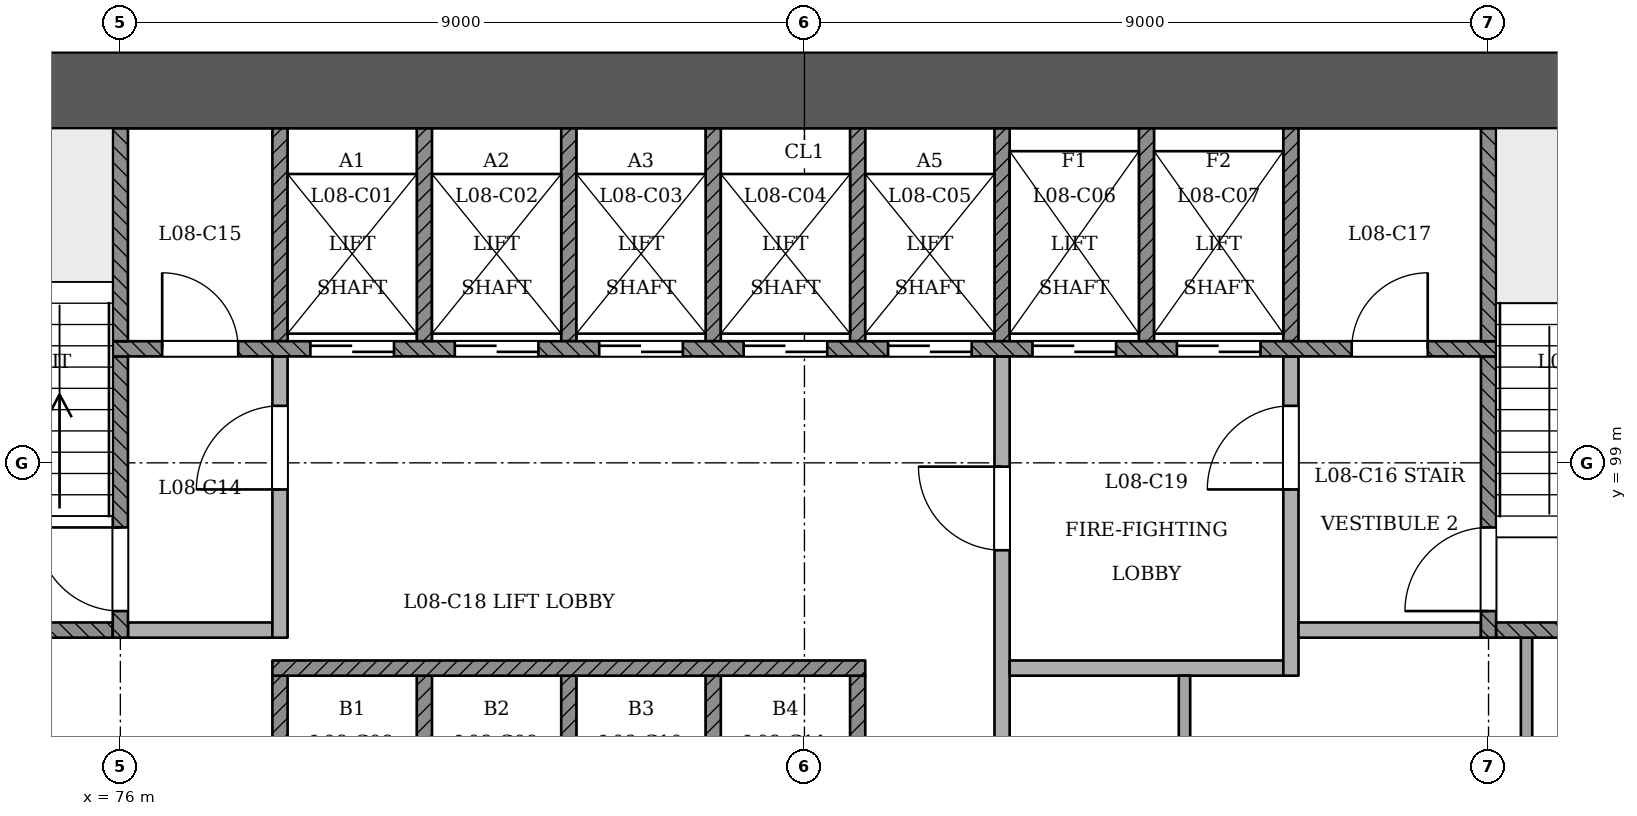
"""IFC4 building model, lengths in metres.
Left out: names, types, materials, properties, quantities, classifications, styles, units other than length and angle.
Written with IfcOpenShell. Run it as: python <this file> out.ifc"""

import sys

from ifc_helpers import new_model, si_unit, direction, frame, frame_2d, origin, place, context, subcontext, project, spatial, rectangle, extrude, element, fill, save


model = new_model("IFC4")
c1 = context("Model", 3, precision=1e-05, world=origin(), true_north=direction((0.0, 1.0)))
c2 = subcontext(c1, "Body", "Model", "MODEL_VIEW")
j1 = project(units=[si_unit("LENGTHUNIT", "METRE"), si_unit("PLANEANGLEUNIT", "RADIAN")], contexts=[c1])
p1 = place(None, origin())
s1 = spatial("IfcSite", under=j1, at=p1, CompositionType="ELEMENT")
p2 = place(p1, origin())
s2 = spatial("IfcBuilding", under=s1, at=p2, CompositionType="ELEMENT")
p3 = place(p2, frame((0.0, 0.0, 37.8)))
s3 = spatial("IfcBuildingStorey", under=s2, at=p3, CompositionType="ELEMENT", Elevation=37.8)
p4 = place(p3, frame((97.5, 103.9, 0.0), z_axis=(0.0, 0.0, 1.0), x_axis=(-1.0, 0.0, 0.0)))
e1 = element("IfcWall", 1, at=p4, inside=s3, PredefinedType="SHEAR", context=c2, shape_type="SweptSolid", body=[
    extrude(rectangle(XDim=25.5, YDim=1.0, at=frame_2d((12.75, 0.0))), origin(), (0.0, 0.0, 1.0), 3.6),
])
p5 = place(p3, frame((61.497, 96.54, 0.0), z_axis=(0.0, 0.0, 1.0), x_axis=(0.499995935097, -0.866027750645, 0.0)))
e2 = element("IfcWall", 2, at=p5, inside=s3, PredefinedType="PARTITIONING", context=c2, shape_type="SweptSolid", body=[
    extrude(rectangle(XDim=44.742, YDim=0.15, at=frame_2d((22.371, 0.0))), origin(), (0.0, 0.0, 1.0), 2.7),
])
p6 = place(p5, frame((1.84, 0.0, 0.0)))
e3 = element("IfcOpeningElement", 3, at=p6, cuts=e2, PredefinedType="OPENING", context=c2, shape_type="SweptSolid", body=[
    extrude(rectangle(XDim=1.0, YDim=2.1, at=frame_2d((0.5, 1.05))), frame((0.0, 0.085, 0.0), z_axis=(0.0, -1.0, 0.0), x_axis=(1.0, 0.0, 0.0)), (0.0, 0.0, 1.0), 0.171),
])
p7 = place(p5, frame((4.942, 0.0, 0.0)))
e4 = element("IfcOpeningElement", 4, at=p7, cuts=e2, PredefinedType="OPENING", context=c2, shape_type="SweptSolid", body=[
    extrude(rectangle(XDim=1.1, YDim=2.1, at=frame_2d((0.55, 1.05))), frame((0.0, 0.085, 0.0), z_axis=(0.0, -1.0, 0.0), x_axis=(1.0, 0.0, 0.0)), (0.0, 0.0, 1.0), 0.171),
])
p8 = place(p5, frame((11.651, 0.0, 0.0)))
e5 = element("IfcOpeningElement", 5, at=p8, cuts=e2, PredefinedType="OPENING", context=c2, shape_type="SweptSolid", body=[
    extrude(rectangle(XDim=1.0, YDim=2.1, at=frame_2d((0.5, 1.05))), frame((0.0, 0.085, 0.0), z_axis=(0.0, -1.0, 0.0), x_axis=(1.0, 0.0, 0.0)), (0.0, 0.0, 1.0), 0.171),
])
p9 = place(p5, frame((18.371, 0.0, 0.0)))
e6 = element("IfcOpeningElement", 6, at=p9, cuts=e2, PredefinedType="OPENING", context=c2, shape_type="SweptSolid", body=[
    extrude(rectangle(XDim=1.2, YDim=2.1, at=frame_2d((0.6, 1.05))), frame((0.0, 0.085, 0.0), z_axis=(0.0, -1.0, 0.0), x_axis=(1.0, 0.0, 0.0)), (0.0, 0.0, 1.0), 0.171),
])
p10 = place(p5, frame((23.092, 0.0, 0.0)))
e7 = element("IfcOpeningElement", 7, at=p10, cuts=e2, PredefinedType="OPENING", context=c2, shape_type="SweptSolid", body=[
    extrude(rectangle(XDim=1.0, YDim=2.1, at=frame_2d((0.5, 1.05))), frame((0.0, 0.085, 0.0), z_axis=(0.0, -1.0, 0.0), x_axis=(1.0, 0.0, 0.0)), (0.0, 0.0, 1.0), 0.171),
])
p11 = place(p5, frame((29.767, 0.0, 0.0)))
e8 = element("IfcOpeningElement", 8, at=p11, cuts=e2, PredefinedType="OPENING", context=c2, shape_type="SweptSolid", body=[
    extrude(rectangle(XDim=1.0, YDim=2.1, at=frame_2d((0.5, 1.05))), frame((0.0, 0.085, 0.0), z_axis=(0.0, -1.0, 0.0), x_axis=(1.0, 0.0, 0.0)), (0.0, 0.0, 1.0), 0.171),
])
p12 = place(p5, frame((31.976, 0.0, 0.0)))
e9 = element("IfcOpeningElement", 9, at=p12, cuts=e2, PredefinedType="OPENING", context=c2, shape_type="SweptSolid", body=[
    extrude(rectangle(XDim=1.0, YDim=2.1, at=frame_2d((0.5, 1.05))), frame((0.0, 0.085, 0.0), z_axis=(0.0, -1.0, 0.0), x_axis=(1.0, 0.0, 0.0)), (0.0, 0.0, 1.0), 0.171),
])
p13 = place(p5, frame((38.767, 0.0, 0.0)))
e10 = element("IfcOpeningElement", 10, at=p13, cuts=e2, PredefinedType="OPENING", context=c2, shape_type="SweptSolid", body=[
    extrude(rectangle(XDim=1.0, YDim=2.1, at=frame_2d((0.5, 1.05))), frame((0.0, 0.085, 0.0), z_axis=(0.0, -1.0, 0.0), x_axis=(1.0, 0.0, 0.0)), (0.0, 0.0, 1.0), 0.171),
])
p14 = place(p5, frame((40.707, 0.0, 0.0)))
e11 = element("IfcOpeningElement", 11, at=p14, cuts=e2, PredefinedType="OPENING", context=c2, shape_type="SweptSolid", body=[
    extrude(rectangle(XDim=1.0, YDim=2.1, at=frame_2d((0.5, 1.05))), frame((0.0, 0.085, 0.0), z_axis=(0.0, -1.0, 0.0), x_axis=(1.0, 0.0, 0.0)), (0.0, 0.0, 1.0), 0.171),
])
for number, where, z_axis, x_axis in (
    (12, (78.1, 93.4, 0.0), (0.0, 0.0, 1.0), (0.0, 1.0, 0.0)),
    (13, (80.0, 93.4, 0.0), (0.0, 0.0, 1.0), (0.0, 1.0, 0.0)),
    (14, (81.9, 93.4, 0.0), (0.0, 0.0, 1.0), (0.0, 1.0, 0.0)),
    (15, (83.8, 93.4, 0.0), (0.0, 0.0, 1.0), (0.0, 1.0, 0.0)),
    (16, (85.7, 93.4, 0.0), (0.0, 0.0, 1.0), (0.0, 1.0, 0.0)),
):
    element("IfcWall", number, at=place(p3, frame(where, z_axis=z_axis, x_axis=x_axis)), inside=s3, PredefinedType="SOLIDWALL", context=c2, shape_type="SweptSolid", body=[
        extrude(rectangle(XDim=2.8, YDim=0.2, at=frame_2d((1.4, 0.0))), origin(), (0.0, 0.0, 1.0), 3.1),
    ])
p15 = place(p3, frame((87.6, 93.4, 0.0), z_axis=(0.0, 0.0, 1.0), x_axis=(0.0, 1.0, 0.0)))
e17 = element("IfcWall", 17, at=p15, inside=s3, PredefinedType="PARTITIONING", context=c2, shape_type="SweptSolid", body=[
    extrude(rectangle(XDim=7.0, YDim=0.2, at=frame_2d((3.5, 0.0))), origin(), (0.0, 0.0, 1.0), 3.1),
])
p16 = place(p15, frame((4.45, 0.0, 0.0)))
e18 = element("IfcOpeningElement", 18, at=p16, cuts=e17, PredefinedType="OPENING", context=c2, shape_type="SweptSolid", body=[
    extrude(rectangle(XDim=1.1, YDim=2.1, at=frame_2d((0.55, 1.05))), frame((0.0, 0.11, 0.0), z_axis=(0.0, -1.0, 0.0), x_axis=(1.0, 0.0, 0.0)), (0.0, 0.0, 1.0), 0.221),
])
p17 = place(p3, frame((90.0, 93.4, 0.0), z_axis=(0.0, 0.0, 1.0), x_axis=(0.0, 1.0, 0.0)))
e19 = element("IfcWall", 19, at=p17, inside=s3, PredefinedType="PARTITIONING", context=c2, shape_type="SweptSolid", body=[
    extrude(rectangle(XDim=2.8, YDim=0.15, at=frame_2d((1.4, 0.0))), origin(), (0.0, 0.0, 1.0), 3.1),
])
p18 = place(p3, frame((94.5, 93.4, 0.0), z_axis=(0.0, 0.0, 1.0), x_axis=(0.0, 1.0, 0.0)))
e20 = element("IfcWall", 20, at=p18, inside=s3, PredefinedType="PARTITIONING", context=c2, shape_type="SweptSolid", body=[
    extrude(rectangle(XDim=3.3, YDim=0.15, at=frame_2d((1.65, 0.0))), origin(), (0.0, 0.0, 1.0), 3.1),
])
p19 = place(p3, frame((78.0, 96.3, 0.0), z_axis=(0.0, 0.0, 1.0), x_axis=(1.0, 0.0, 0.0)))
e21 = element("IfcWall", 21, at=p19, inside=s3, PredefinedType="SOLIDWALL", context=c2, shape_type="SweptSolid", body=[
    extrude(rectangle(XDim=7.8, YDim=0.2, at=frame_2d((3.9, 0.0))), origin(), (0.0, 0.0, 1.0), 3.1),
])
p20 = place(p3, frame((87.7, 96.3, 0.0), z_axis=(0.0, 0.0, 1.0), x_axis=(1.0, 0.0, 0.0)))
e22 = element("IfcWall", 22, at=p20, inside=s3, PredefinedType="PARTITIONING", context=c2, shape_type="SweptSolid", body=[
    extrude(rectangle(XDim=3.6, YDim=0.2, at=frame_2d((1.8, 0.0))), origin(), (0.0, 0.0, 1.0), 3.1),
])
p21 = place(p3, frame((91.4, 96.2, 0.0), z_axis=(0.0, 0.0, 1.0), x_axis=(0.0, 1.0, 0.0)))
e23 = element("IfcWall", 23, at=p21, inside=s3, PredefinedType="PARTITIONING", context=c2, shape_type="SweptSolid", body=[
    extrude(rectangle(XDim=4.2, YDim=0.2, at=frame_2d((2.1, 0.0))), origin(), (0.0, 0.0, 1.0), 3.1),
])
p22 = place(p21, frame((2.45, 0.0, 0.0)))
e24 = element("IfcOpeningElement", 24, at=p22, cuts=e23, PredefinedType="OPENING", context=c2, shape_type="SweptSolid", body=[
    extrude(rectangle(XDim=1.1, YDim=2.1, at=frame_2d((0.55, 1.05))), frame((0.0, 0.11, 0.0), z_axis=(0.0, -1.0, 0.0), x_axis=(1.0, 0.0, 0.0)), (0.0, 0.0, 1.0), 0.221),
])
p23 = place(p3, frame((73.0, 96.8, 0.0), z_axis=(0.0, 0.0, 1.0), x_axis=(1.0, 0.0, 0.0)))
e25 = element("IfcWall", 25, at=p23, inside=s3, PredefinedType="SOLIDWALL", context=c2, shape_type="SweptSolid", body=[
    extrude(rectangle(XDim=2.9, YDim=0.2, at=frame_2d((1.45, 0.0))), origin(), (0.0, 0.0, 1.0), 3.1),
])
p24 = place(p3, frame((76.0, 96.7, 0.0), z_axis=(0.0, 0.0, 1.0), x_axis=(0.0, 1.0, 0.0)))
e26 = element("IfcWall", 26, at=p24, inside=s3, PredefinedType="SOLIDWALL", context=c2, shape_type="SweptSolid", body=[
    extrude(rectangle(XDim=3.7, YDim=0.2, at=frame_2d((1.85, 0.0))), origin(), (0.0, 0.0, 1.0), 3.1),
])
p25 = place(p24, frame((0.35, 0.0, 0.0)))
e27 = element("IfcOpeningElement", 27, at=p25, cuts=e26, PredefinedType="OPENING", context=c2, shape_type="SweptSolid", body=[
    extrude(rectangle(XDim=1.1, YDim=2.1, at=frame_2d((0.55, 1.05))), frame((0.0, 0.11, 0.0), z_axis=(0.0, -1.0, 0.0), x_axis=(1.0, 0.0, 0.0)), (0.0, 0.0, 1.0), 0.221),
])
p26 = place(p3, frame((76.1, 96.8, 0.0), z_axis=(0.0, 0.0, 1.0), x_axis=(1.0, 0.0, 0.0)))
e28 = element("IfcWall", 28, at=p26, inside=s3, PredefinedType="PARTITIONING", context=c2, shape_type="SweptSolid", body=[
    extrude(rectangle(XDim=1.9, YDim=0.2, at=frame_2d((0.95, 0.0))), origin(), (0.0, 0.0, 1.0), 3.1),
])
p27 = place(p3, frame((78.1, 96.7, 0.0), z_axis=(0.0, 0.0, 1.0), x_axis=(0.0, 1.0, 0.0)))
e29 = element("IfcWall", 29, at=p27, inside=s3, PredefinedType="PARTITIONING", context=c2, shape_type="SweptSolid", body=[
    extrude(rectangle(XDim=3.7, YDim=0.2, at=frame_2d((1.85, 0.0))), origin(), (0.0, 0.0, 1.0), 3.1),
])
p28 = place(p27, frame((1.95, 0.0, 0.0)))
e30 = element("IfcOpeningElement", 30, at=p28, cuts=e29, PredefinedType="OPENING", context=c2, shape_type="SweptSolid", body=[
    extrude(rectangle(XDim=1.1, YDim=2.1, at=frame_2d((0.55, 1.05))), frame((0.0, 0.11, 0.0), z_axis=(0.0, -1.0, 0.0), x_axis=(1.0, 0.0, 0.0)), (0.0, 0.0, 1.0), 0.221),
])
p29 = place(p3, frame((91.5, 96.8, 0.0), z_axis=(0.0, 0.0, 1.0), x_axis=(1.0, 0.0, 0.0)))
e31 = element("IfcWall", 31, at=p29, inside=s3, PredefinedType="PARTITIONING", context=c2, shape_type="SweptSolid", body=[
    extrude(rectangle(XDim=2.4, YDim=0.2, at=frame_2d((1.2, 0.0))), origin(), (0.0, 0.0, 1.0), 3.1),
])
p30 = place(p3, frame((94.0, 96.7, 0.0), z_axis=(0.0, 0.0, 1.0), x_axis=(0.0, 1.0, 0.0)))
e32 = element("IfcWall", 32, at=p30, inside=s3, PredefinedType="SOLIDWALL", context=c2, shape_type="SweptSolid", body=[
    extrude(rectangle(XDim=3.7, YDim=0.2, at=frame_2d((1.85, 0.0))), origin(), (0.0, 0.0, 1.0), 3.1),
])
p31 = place(p30, frame((0.35, 0.0, 0.0)))
e33 = element("IfcOpeningElement", 33, at=p31, cuts=e32, PredefinedType="OPENING", context=c2, shape_type="SweptSolid", body=[
    extrude(rectangle(XDim=1.1, YDim=2.1, at=frame_2d((0.55, 1.05))), frame((0.0, 0.11, 0.0), z_axis=(0.0, -1.0, 0.0), x_axis=(1.0, 0.0, 0.0)), (0.0, 0.0, 1.0), 0.221),
])
p32 = place(p3, frame((94.1, 96.8, 0.0), z_axis=(0.0, 0.0, 1.0), x_axis=(1.0, 0.0, 0.0)))
e34 = element("IfcWall", 34, at=p32, inside=s3, PredefinedType="SOLIDWALL", context=c2, shape_type="SweptSolid", body=[
    extrude(rectangle(XDim=2.9, YDim=0.2, at=frame_2d((1.45, 0.0))), origin(), (0.0, 0.0, 1.0), 3.1),
])
p33 = place(p3, frame((75.9, 100.5, 0.0), z_axis=(0.0, 0.0, 1.0), x_axis=(1.0, 0.0, 0.0)))
e35 = element("IfcWall", 35, at=p33, inside=s3, PredefinedType="SOLIDWALL", context=c2, shape_type="SweptSolid", body=[
    extrude(rectangle(XDim=18.2, YDim=0.2, at=frame_2d((9.1, 0.0))), origin(), (0.0, 0.0, 1.0), 3.1),
])
p34 = place(p33, frame((2.6, 0.0, 0.0)))
e36 = element("IfcOpeningElement", 36, at=p34, cuts=e35, PredefinedType="OPENING", context=c2, shape_type="SweptSolid", body=[
    extrude(rectangle(XDim=1.1, YDim=2.1, at=frame_2d((0.55, 1.05))), frame((0.0, 0.11, 0.0), z_axis=(0.0, -1.0, 0.0), x_axis=(1.0, 0.0, 0.0)), (0.0, 0.0, 1.0), 0.221),
])
p35 = place(p33, frame((4.5, 0.0, 0.0)))
e37 = element("IfcOpeningElement", 37, at=p35, cuts=e35, PredefinedType="OPENING", context=c2, shape_type="SweptSolid", body=[
    extrude(rectangle(XDim=1.1, YDim=2.1, at=frame_2d((0.55, 1.05))), frame((0.0, 0.11, 0.0), z_axis=(0.0, -1.0, 0.0), x_axis=(1.0, 0.0, 0.0)), (0.0, 0.0, 1.0), 0.221),
])
p36 = place(p33, frame((6.4, 0.0, 0.0)))
e38 = element("IfcOpeningElement", 38, at=p36, cuts=e35, PredefinedType="OPENING", context=c2, shape_type="SweptSolid", body=[
    extrude(rectangle(XDim=1.1, YDim=2.1, at=frame_2d((0.55, 1.05))), frame((0.0, 0.11, 0.0), z_axis=(0.0, -1.0, 0.0), x_axis=(1.0, 0.0, 0.0)), (0.0, 0.0, 1.0), 0.221),
])
p37 = place(p33, frame((8.3, 0.0, 0.0)))
e39 = element("IfcOpeningElement", 39, at=p37, cuts=e35, PredefinedType="OPENING", context=c2, shape_type="SweptSolid", body=[
    extrude(rectangle(XDim=1.1, YDim=2.1, at=frame_2d((0.55, 1.05))), frame((0.0, 0.11, 0.0), z_axis=(0.0, -1.0, 0.0), x_axis=(1.0, 0.0, 0.0)), (0.0, 0.0, 1.0), 0.221),
])
p38 = place(p33, frame((10.2, 0.0, 0.0)))
e40 = element("IfcOpeningElement", 40, at=p38, cuts=e35, PredefinedType="OPENING", context=c2, shape_type="SweptSolid", body=[
    extrude(rectangle(XDim=1.1, YDim=2.1, at=frame_2d((0.55, 1.05))), frame((0.0, 0.11, 0.0), z_axis=(0.0, -1.0, 0.0), x_axis=(1.0, 0.0, 0.0)), (0.0, 0.0, 1.0), 0.221),
])
p39 = place(p33, frame((12.1, 0.0, 0.0)))
e41 = element("IfcOpeningElement", 41, at=p39, cuts=e35, PredefinedType="OPENING", context=c2, shape_type="SweptSolid", body=[
    extrude(rectangle(XDim=1.1, YDim=2.1, at=frame_2d((0.55, 1.05))), frame((0.0, 0.11, 0.0), z_axis=(0.0, -1.0, 0.0), x_axis=(1.0, 0.0, 0.0)), (0.0, 0.0, 1.0), 0.221),
])
p40 = place(p33, frame((14.0, 0.0, 0.0)))
e42 = element("IfcOpeningElement", 42, at=p40, cuts=e35, PredefinedType="OPENING", context=c2, shape_type="SweptSolid", body=[
    extrude(rectangle(XDim=1.1, YDim=2.1, at=frame_2d((0.55, 1.05))), frame((0.0, 0.11, 0.0), z_axis=(0.0, -1.0, 0.0), x_axis=(1.0, 0.0, 0.0)), (0.0, 0.0, 1.0), 0.221),
])
p41 = place(p33, frame((0.65, 0.0, 0.0)))
e43 = element("IfcOpeningElement", 43, at=p41, cuts=e35, PredefinedType="OPENING", context=c2, shape_type="SweptSolid", body=[
    extrude(rectangle(XDim=1.0, YDim=2.1, at=frame_2d((0.5, 1.05))), frame((0.0, 0.11, 0.0), z_axis=(0.0, -1.0, 0.0), x_axis=(1.0, 0.0, 0.0)), (0.0, 0.0, 1.0), 0.221),
])
p42 = place(p33, frame((16.3, 0.0, 0.0)))
e44 = element("IfcOpeningElement", 44, at=p42, cuts=e35, PredefinedType="OPENING", context=c2, shape_type="SweptSolid", body=[
    extrude(rectangle(XDim=1.0, YDim=2.1, at=frame_2d((0.5, 1.05))), frame((0.0, 0.11, 0.0), z_axis=(0.0, -1.0, 0.0), x_axis=(1.0, 0.0, 0.0)), (0.0, 0.0, 1.0), 0.221),
])
for number, where, z_axis, x_axis in (
    (45, (76.0, 100.6, 0.0), (0.0, 0.0, 1.0), (0.0, 1.0, 0.0)),
    (46, (78.1, 100.6, 0.0), (0.0, 0.0, 1.0), (0.0, 1.0, 0.0)),
    (47, (80.0, 100.6, 0.0), (0.0, 0.0, 1.0), (0.0, 1.0, 0.0)),
    (48, (81.9, 100.6, 0.0), (0.0, 0.0, 1.0), (0.0, 1.0, 0.0)),
    (49, (83.8, 100.6, 0.0), (0.0, 0.0, 1.0), (0.0, 1.0, 0.0)),
    (50, (85.7, 100.6, 0.0), (0.0, 0.0, 1.0), (0.0, 1.0, 0.0)),
    (51, (87.6, 100.6, 0.0), (0.0, 0.0, 1.0), (0.0, 1.0, 0.0)),
    (52, (89.5, 100.6, 0.0), (0.0, 0.0, 1.0), (0.0, 1.0, 0.0)),
    (53, (91.4, 100.6, 0.0), (0.0, 0.0, 1.0), (0.0, 1.0, 0.0)),
    (54, (94.0, 100.6, 0.0), (0.0, 0.0, 1.0), (0.0, 1.0, 0.0)),
):
    element("IfcWall", number, at=place(p3, frame(where, z_axis=z_axis, x_axis=x_axis)), inside=s3, PredefinedType="SOLIDWALL", context=c2, shape_type="SweptSolid", body=[
        extrude(rectangle(XDim=2.8, YDim=0.2, at=frame_2d((1.4, 0.0))), origin(), (0.0, 0.0, 1.0), 3.1),
    ])
p43 = place(p34, origin())
e55 = element("IfcDoor", 55, at=p43, inside=s3, OperationType="SLIDING_TO_RIGHT", PredefinedType="NOTDEFINED", context=c2, shape_type="SweptSolid", body=[
    extrude(rectangle(XDim=1.1, YDim=2.1, at=frame_2d((0.55, 1.05))), frame((0.0, 0.025, 0.0), z_axis=(0.0, -1.0, 0.0), x_axis=(1.0, 0.0, 0.0)), (0.0, 0.0, 1.0), 0.05),
])
fill(e36, e55)
p44 = place(p35, origin())
e56 = element("IfcDoor", 56, at=p44, inside=s3, OperationType="SLIDING_TO_LEFT", PredefinedType="NOTDEFINED", context=c2, shape_type="SweptSolid", body=[
    extrude(rectangle(XDim=1.1, YDim=2.1, at=frame_2d((0.55, 1.05))), frame((0.0, 0.025, 0.0), z_axis=(0.0, -1.0, 0.0), x_axis=(1.0, 0.0, 0.0)), (0.0, 0.0, 1.0), 0.05),
])
fill(e37, e56)
p45 = place(p36, origin())
e57 = element("IfcDoor", 57, at=p45, inside=s3, OperationType="SLIDING_TO_RIGHT", PredefinedType="NOTDEFINED", context=c2, shape_type="SweptSolid", body=[
    extrude(rectangle(XDim=1.1, YDim=2.1, at=frame_2d((0.55, 1.05))), frame((0.0, 0.025, 0.0), z_axis=(0.0, -1.0, 0.0), x_axis=(1.0, 0.0, 0.0)), (0.0, 0.0, 1.0), 0.05),
])
fill(e38, e57)
p46 = place(p37, origin())
e58 = element("IfcDoor", 58, at=p46, inside=s3, OperationType="SLIDING_TO_LEFT", PredefinedType="NOTDEFINED", context=c2, shape_type="SweptSolid", body=[
    extrude(rectangle(XDim=1.1, YDim=2.1, at=frame_2d((0.55, 1.05))), frame((0.0, 0.025, 0.0), z_axis=(0.0, -1.0, 0.0), x_axis=(1.0, 0.0, 0.0)), (0.0, 0.0, 1.0), 0.05),
])
fill(e39, e58)
p47 = place(p38, origin())
e59 = element("IfcDoor", 59, at=p47, inside=s3, OperationType="SLIDING_TO_RIGHT", PredefinedType="NOTDEFINED", context=c2, shape_type="SweptSolid", body=[
    extrude(rectangle(XDim=1.1, YDim=2.1, at=frame_2d((0.55, 1.05))), frame((0.0, 0.025, 0.0), z_axis=(0.0, -1.0, 0.0), x_axis=(1.0, 0.0, 0.0)), (0.0, 0.0, 1.0), 0.05),
])
fill(e40, e59)
p48 = place(p39, origin())
e60 = element("IfcDoor", 60, at=p48, inside=s3, OperationType="SLIDING_TO_RIGHT", PredefinedType="NOTDEFINED", context=c2, shape_type="SweptSolid", body=[
    extrude(rectangle(XDim=1.1, YDim=2.1, at=frame_2d((0.55, 1.05))), frame((0.0, 0.025, 0.0), z_axis=(0.0, -1.0, 0.0), x_axis=(1.0, 0.0, 0.0)), (0.0, 0.0, 1.0), 0.05),
])
fill(e41, e60)
p49 = place(p40, origin())
e61 = element("IfcDoor", 61, at=p49, inside=s3, OperationType="SLIDING_TO_LEFT", PredefinedType="NOTDEFINED", context=c2, shape_type="SweptSolid", body=[
    extrude(rectangle(XDim=1.1, YDim=2.1, at=frame_2d((0.55, 1.05))), frame((0.0, 0.025, 0.0), z_axis=(0.0, -1.0, 0.0), x_axis=(1.0, 0.0, 0.0)), (0.0, 0.0, 1.0), 0.05),
])
fill(e42, e61)
p50 = place(p25, origin())
e62 = element("IfcDoor", 62, at=p50, inside=s3, OperationType="SINGLE_SWING_RIGHT", PredefinedType="NOTDEFINED", context=c2, shape_type="SweptSolid", body=[
    extrude(rectangle(XDim=1.1, YDim=2.1, at=frame_2d((0.55, 1.05))), frame((0.0, 0.025, 0.0), z_axis=(0.0, -1.0, 0.0), x_axis=(1.0, 0.0, 0.0)), (0.0, 0.0, 1.0), 0.05),
])
fill(e27, e62)
p51 = place(p31, origin())
e63 = element("IfcDoor", 63, at=p51, inside=s3, OperationType="SINGLE_SWING_LEFT", PredefinedType="NOTDEFINED", context=c2, shape_type="SweptSolid", body=[
    extrude(rectangle(XDim=1.1, YDim=2.1, at=frame_2d((0.55, 1.05))), frame((0.0, 0.025, 0.0), z_axis=(0.0, -1.0, 0.0), x_axis=(1.0, 0.0, 0.0)), (0.0, 0.0, 1.0), 0.05),
])
fill(e33, e63)
p52 = place(p28, origin())
e64 = element("IfcDoor", 64, at=p52, inside=s3, OperationType="SINGLE_SWING_LEFT", PredefinedType="NOTDEFINED", context=c2, shape_type="SweptSolid", body=[
    extrude(rectangle(XDim=1.1, YDim=2.1, at=frame_2d((0.55, 1.05))), frame((0.0, 0.025, 0.0), z_axis=(0.0, -1.0, 0.0), x_axis=(1.0, 0.0, 0.0)), (0.0, 0.0, 1.0), 0.05),
])
fill(e30, e64)
p53 = place(p16, origin())
e65 = element("IfcDoor", 65, at=p53, inside=s3, OperationType="SINGLE_SWING_RIGHT", PredefinedType="NOTDEFINED", context=c2, shape_type="SweptSolid", body=[
    extrude(rectangle(XDim=1.1, YDim=2.1, at=frame_2d((0.55, 1.05))), frame((0.0, 0.025, 0.0), z_axis=(0.0, -1.0, 0.0), x_axis=(1.0, 0.0, 0.0)), (0.0, 0.0, 1.0), 0.05),
])
fill(e18, e65)
p54 = place(p22, origin())
e66 = element("IfcDoor", 66, at=p54, inside=s3, OperationType="SINGLE_SWING_LEFT", PredefinedType="NOTDEFINED", context=c2, shape_type="SweptSolid", body=[
    extrude(rectangle(XDim=1.1, YDim=2.1, at=frame_2d((0.55, 1.05))), frame((0.0, 0.025, 0.0), z_axis=(0.0, -1.0, 0.0), x_axis=(1.0, 0.0, 0.0)), (0.0, 0.0, 1.0), 0.05),
])
fill(e24, e66)
p55 = place(p41, origin())
e67 = element("IfcDoor", 67, at=p55, inside=s3, OperationType="SINGLE_SWING_LEFT", PredefinedType="NOTDEFINED", context=c2, shape_type="SweptSolid", body=[
    extrude(rectangle(XDim=1.0, YDim=2.1, at=frame_2d((0.5, 1.05))), frame((0.0, 0.025, 0.0), z_axis=(0.0, -1.0, 0.0), x_axis=(1.0, 0.0, 0.0)), (0.0, 0.0, 1.0), 0.05),
])
fill(e43, e67)
p56 = place(p42, origin())
e68 = element("IfcDoor", 68, at=p56, inside=s3, OperationType="SINGLE_SWING_RIGHT", PredefinedType="NOTDEFINED", context=c2, shape_type="SweptSolid", body=[
    extrude(rectangle(XDim=1.0, YDim=2.1, at=frame_2d((0.5, 1.05))), frame((0.0, 0.025, 0.0), z_axis=(0.0, -1.0, 0.0), x_axis=(1.0, 0.0, 0.0)), (0.0, 0.0, 1.0), 0.05),
])
fill(e44, e68)
save(model, sys.argv[1])
